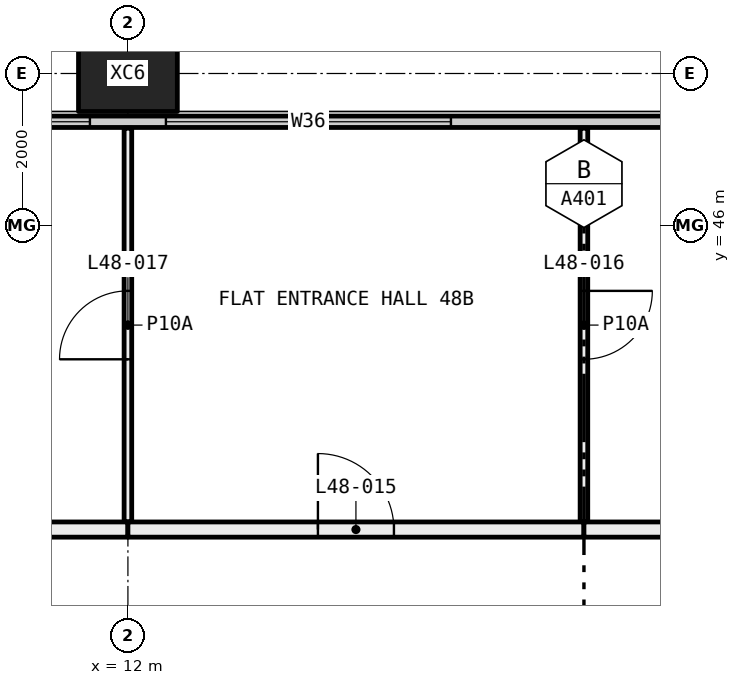
"""IFC4 building model, lengths in metres.
Left out: names, types, materials, properties, quantities, classifications, styles, units other than length and angle.
Written with IfcOpenShell. Run it as: python <this file> out.ifc"""

import sys

from ifc_helpers import new_model, si_unit, direction, frame, frame_2d, origin, origin_2d, place, context, subcontext, project, spatial, rectangle, hollow_rectangle, extrude, element, fill, save


model = new_model("IFC4")
c1 = context("Model", 3, precision=1e-05, world=origin(), true_north=direction((0.0, 1.0)))
c2 = subcontext(c1, "Body", "Model", "MODEL_VIEW")
j1 = project(units=[si_unit("LENGTHUNIT", "METRE"), si_unit("PLANEANGLEUNIT", "RADIAN")], contexts=[c1])
p1 = place(None, origin())
s1 = spatial("IfcSite", under=j1, at=p1, CompositionType="ELEMENT")
p2 = place(p1, origin())
s2 = spatial("IfcBuilding", under=s1, at=p2, CompositionType="ELEMENT")
p3 = place(p2, frame((0.0, 0.0, 182.4)))
s3 = spatial("IfcBuildingStorey", under=s2, at=p3, CompositionType="ELEMENT", Elevation=182.4)
p4 = place(p3, frame((12.0, 48.0, -0.4), z_axis=(0.0, 0.0, 1.0), x_axis=(1.0, 0.0, 0.0)))
e1 = element("IfcColumn", 1, at=p4, inside=s3, PredefinedType="COLUMN", context=c2, shape_type="SweptSolid", body=[
    extrude(hollow_rectangle(XDim=1.3, YDim=1.0, WallThickness=0.05, at=origin_2d()), origin(), (0.0, 0.0, 1.0), 3.45),
])
p5 = place(p3, frame((6.56, 47.365, 0.0), z_axis=(0.0, 0.0, 1.0), x_axis=(1.0, 0.0, 0.0)))
e2 = element("IfcWall", 2, at=p5, inside=s3, PredefinedType="ELEMENTEDWALL", context=c2, shape_type="SweptSolid", body=[
    extrude(rectangle(XDim=46.88, YDim=0.15, at=frame_2d((23.44, 0.0))), origin(), (0.0, 0.0, 1.0), 3.05),
])
p6 = place(p5, frame((0.44, 0.0, 0.45)))
e3 = element("IfcOpeningElement", 3, at=p6, cuts=e2, PredefinedType="OPENING", context=c2, shape_type="SweptSolid", body=[
    extrude(rectangle(XDim=4.5, YDim=2.55, at=frame_2d((2.25, 1.275))), frame((0.0, 0.085, 0.0), z_axis=(0.0, -1.0, 0.0), x_axis=(1.0, 0.0, 0.0)), (0.0, 0.0, 1.0), 0.17),
])
p7 = place(p5, frame((5.94, 0.0, 0.45)))
e4 = element("IfcOpeningElement", 4, at=p7, cuts=e2, PredefinedType="OPENING", context=c2, shape_type="SweptSolid", body=[
    extrude(rectangle(XDim=3.75, YDim=2.55, at=frame_2d((1.875, 1.275))), frame((0.0, 0.085, 0.0), z_axis=(0.0, -1.0, 0.0), x_axis=(1.0, 0.0, 0.0)), (0.0, 0.0, 1.0), 0.17),
])
p8 = place(p5, frame((13.19, 0.0, 0.45)))
e5 = element("IfcOpeningElement", 5, at=p8, cuts=e2, PredefinedType="OPENING", context=c2, shape_type="SweptSolid", body=[
    extrude(rectangle(XDim=3.75, YDim=2.55, at=frame_2d((1.875, 1.275))), frame((0.0, 0.085, 0.0), z_axis=(0.0, -1.0, 0.0), x_axis=(1.0, 0.0, 0.0)), (0.0, 0.0, 1.0), 0.17),
])
p9 = place(p5, frame((17.94, 0.0, 0.45)))
e6 = element("IfcOpeningElement", 6, at=p9, cuts=e2, PredefinedType="OPENING", context=c2, shape_type="SweptSolid", body=[
    extrude(rectangle(XDim=3.75, YDim=2.55, at=frame_2d((1.875, 1.275))), frame((0.0, 0.085, 0.0), z_axis=(0.0, -1.0, 0.0), x_axis=(1.0, 0.0, 0.0)), (0.0, 0.0, 1.0), 0.17),
])
p10 = place(p5, frame((25.19, 0.0, 0.45)))
e7 = element("IfcOpeningElement", 7, at=p10, cuts=e2, PredefinedType="OPENING", context=c2, shape_type="SweptSolid", body=[
    extrude(rectangle(XDim=0.75, YDim=2.55, at=frame_2d((0.375, 1.275))), frame((0.0, 0.085, 0.0), z_axis=(0.0, -1.0, 0.0), x_axis=(1.0, 0.0, 0.0)), (0.0, 0.0, 1.0), 0.17),
])
p11 = place(p5, frame((26.94, 0.0, 0.45)))
e8 = element("IfcOpeningElement", 8, at=p11, cuts=e2, PredefinedType="OPENING", context=c2, shape_type="SweptSolid", body=[
    extrude(rectangle(XDim=2.0, YDim=2.55, at=frame_2d((1.0, 1.275))), frame((0.0, 0.085, 0.0), z_axis=(0.0, -1.0, 0.0), x_axis=(1.0, 0.0, 0.0)), (0.0, 0.0, 1.0), 0.17),
])
p12 = place(p5, frame((29.94, 0.0, 0.45)))
e9 = element("IfcOpeningElement", 9, at=p12, cuts=e2, PredefinedType="OPENING", context=c2, shape_type="SweptSolid", body=[
    extrude(rectangle(XDim=3.75, YDim=2.55, at=frame_2d((1.875, 1.275))), frame((0.0, 0.085, 0.0), z_axis=(0.0, -1.0, 0.0), x_axis=(1.0, 0.0, 0.0)), (0.0, 0.0, 1.0), 0.17),
])
p13 = place(p5, frame((37.19, 0.0, 0.45)))
e10 = element("IfcOpeningElement", 10, at=p13, cuts=e2, PredefinedType="OPENING", context=c2, shape_type="SweptSolid", body=[
    extrude(rectangle(XDim=3.75, YDim=2.55, at=frame_2d((1.875, 1.275))), frame((0.0, 0.085, 0.0), z_axis=(0.0, -1.0, 0.0), x_axis=(1.0, 0.0, 0.0)), (0.0, 0.0, 1.0), 0.17),
])
p14 = place(p5, frame((41.94, 0.0, 0.45)))
e11 = element("IfcOpeningElement", 11, at=p14, cuts=e2, PredefinedType="OPENING", context=c2, shape_type="SweptSolid", body=[
    extrude(rectangle(XDim=4.5, YDim=2.55, at=frame_2d((2.25, 1.275))), frame((0.0, 0.085, 0.0), z_axis=(0.0, -1.0, 0.0), x_axis=(1.0, 0.0, 0.0)), (0.0, 0.0, 1.0), 0.17),
])
p15 = place(p3, frame((12.0, 42.1, 0.0), z_axis=(0.0, 0.0, 1.0), x_axis=(0.0, 1.0, 0.0)))
e12 = element("IfcWall", 12, at=p15, inside=s3, PredefinedType="PARTITIONING", context=c2, shape_type="SweptSolid", body=[
    extrude(rectangle(XDim=5.18, YDim=0.1, at=frame_2d((2.59, 0.0))), origin(), (0.0, 0.0, 1.0), 3.05),
])
p16 = place(p15, frame((2.14, 0.0, 0.0)))
e13 = element("IfcOpeningElement", 13, at=p16, cuts=e12, PredefinedType="OPENING", context=c2, shape_type="SweptSolid", body=[
    extrude(rectangle(XDim=0.9, YDim=2.1, at=frame_2d((0.45, 1.05))), frame((0.0, 0.06, 0.0), z_axis=(0.0, -1.0, 0.0), x_axis=(1.0, 0.0, 0.0)), (0.0, 0.0, 1.0), 0.12),
])
p17 = place(p3, frame((10.1, 42.0, 0.0), z_axis=(0.0, 0.0, 1.0), x_axis=(1.0, 0.0, 0.0)))
e14 = element("IfcWall", 14, at=p17, inside=s3, PredefinedType="PARTITIONING", context=c2, shape_type="SweptSolid", body=[
    extrude(rectangle(XDim=1.9, YDim=0.2, at=frame_2d((0.95, 0.0))), origin(), (0.0, 0.0, 1.0), 3.05),
])
p18 = place(p3, frame((18.0, 42.1, 0.0), z_axis=(0.0, 0.0, 1.0), x_axis=(0.0, 1.0, 0.0)))
e15 = element("IfcWall", 15, at=p18, inside=s3, PredefinedType="PARTITIONING", context=c2, shape_type="SweptSolid", body=[
    extrude(rectangle(XDim=5.18, YDim=0.1, at=frame_2d((2.59, 0.0))), origin(), (0.0, 0.0, 1.0), 3.05),
])
p19 = place(p18, frame((2.14, 0.0, 0.0)))
e16 = element("IfcOpeningElement", 16, at=p19, cuts=e15, PredefinedType="OPENING", context=c2, shape_type="SweptSolid", body=[
    extrude(rectangle(XDim=0.9, YDim=2.1, at=frame_2d((0.45, 1.05))), frame((0.0, 0.06, 0.0), z_axis=(0.0, -1.0, 0.0), x_axis=(1.0, 0.0, 0.0)), (0.0, 0.0, 1.0), 0.12),
])
p20 = place(p3, frame((12.0, 42.0, 0.0), z_axis=(0.0, 0.0, 1.0), x_axis=(1.0, 0.0, 0.0)))
e17 = element("IfcWall", 17, at=p20, inside=s3, PredefinedType="PARTITIONING", context=c2, shape_type="SweptSolid", body=[
    extrude(rectangle(XDim=6.0, YDim=0.2, at=frame_2d((3.0, 0.0))), origin(), (0.0, 0.0, 1.0), 3.05),
])
p21 = place(p20, frame((2.5, 0.0, 0.0)))
e18 = element("IfcOpeningElement", 18, at=p21, cuts=e17, PredefinedType="OPENING", context=c2, shape_type="SweptSolid", body=[
    extrude(rectangle(XDim=1.0, YDim=2.1, at=frame_2d((0.5, 1.05))), frame((0.0, 0.11, 0.0), z_axis=(0.0, -1.0, 0.0), x_axis=(1.0, 0.0, 0.0)), (0.0, 0.0, 1.0), 0.22),
])
p22 = place(p3, frame((18.0, 42.0, 0.0), z_axis=(0.0, 0.0, 1.0), x_axis=(1.0, 0.0, 0.0)))
e19 = element("IfcWall", 19, at=p22, inside=s3, PredefinedType="PARTITIONING", context=c2, shape_type="SweptSolid", body=[
    extrude(rectangle(XDim=6.0, YDim=0.2, at=frame_2d((3.0, 0.0))), origin(), (0.0, 0.0, 1.0), 3.05),
])
p23 = place(p6, origin())
e20 = element("IfcWindow", 20, at=p23, inside=s3, PartitioningType="SINGLE_PANEL", PredefinedType="WINDOW", context=c2, shape_type="SweptSolid", body=[
    extrude(rectangle(XDim=4.5, YDim=2.55, at=frame_2d((2.25, 1.275))), frame((0.0, 0.03, 0.0), z_axis=(0.0, -1.0, 0.0), x_axis=(1.0, 0.0, 0.0)), (0.0, 0.0, 1.0), 0.06),
])
fill(e3, e20)
p24 = place(p7, origin())
e21 = element("IfcWindow", 21, at=p24, inside=s3, PartitioningType="SINGLE_PANEL", PredefinedType="WINDOW", context=c2, shape_type="SweptSolid", body=[
    extrude(rectangle(XDim=3.75, YDim=2.55, at=frame_2d((1.875, 1.275))), frame((0.0, 0.03, 0.0), z_axis=(0.0, -1.0, 0.0), x_axis=(1.0, 0.0, 0.0)), (0.0, 0.0, 1.0), 0.06),
])
fill(e4, e21)
p25 = place(p21, origin())
e22 = element("IfcDoor", 22, at=p25, inside=s3, OperationType="SINGLE_SWING_RIGHT", PredefinedType="DOOR", context=c2, shape_type="SweptSolid", body=[
    extrude(rectangle(XDim=1.0, YDim=2.1, at=frame_2d((0.5, 1.05))), frame((0.0, 0.025, 0.0), z_axis=(0.0, -1.0, 0.0), x_axis=(1.0, 0.0, 0.0)), (0.0, 0.0, 1.0), 0.05),
])
fill(e18, e22)
p26 = place(p19, frame((0.9, 0.0, 0.0), x_axis=(-1.0, 0.0, 0.0)))
e23 = element("IfcDoor", 23, at=p26, inside=s3, OperationType="SINGLE_SWING_RIGHT", PredefinedType="DOOR", context=c2, shape_type="SweptSolid", body=[
    extrude(rectangle(XDim=0.9, YDim=2.1, at=frame_2d((0.45, 1.05))), frame((0.0, 0.025, 0.0), z_axis=(0.0, -1.0, 0.0), x_axis=(1.0, 0.0, 0.0)), (0.0, 0.0, 1.0), 0.05),
])
fill(e16, e23)
p27 = place(p16, origin())
e24 = element("IfcDoor", 24, at=p27, inside=s3, OperationType="SINGLE_SWING_RIGHT", PredefinedType="DOOR", context=c2, shape_type="SweptSolid", body=[
    extrude(rectangle(XDim=0.9, YDim=2.1, at=frame_2d((0.45, 1.05))), frame((0.0, 0.025, 0.0), z_axis=(0.0, -1.0, 0.0), x_axis=(1.0, 0.0, 0.0)), (0.0, 0.0, 1.0), 0.05),
])
fill(e13, e24)
save(model, sys.argv[1])
